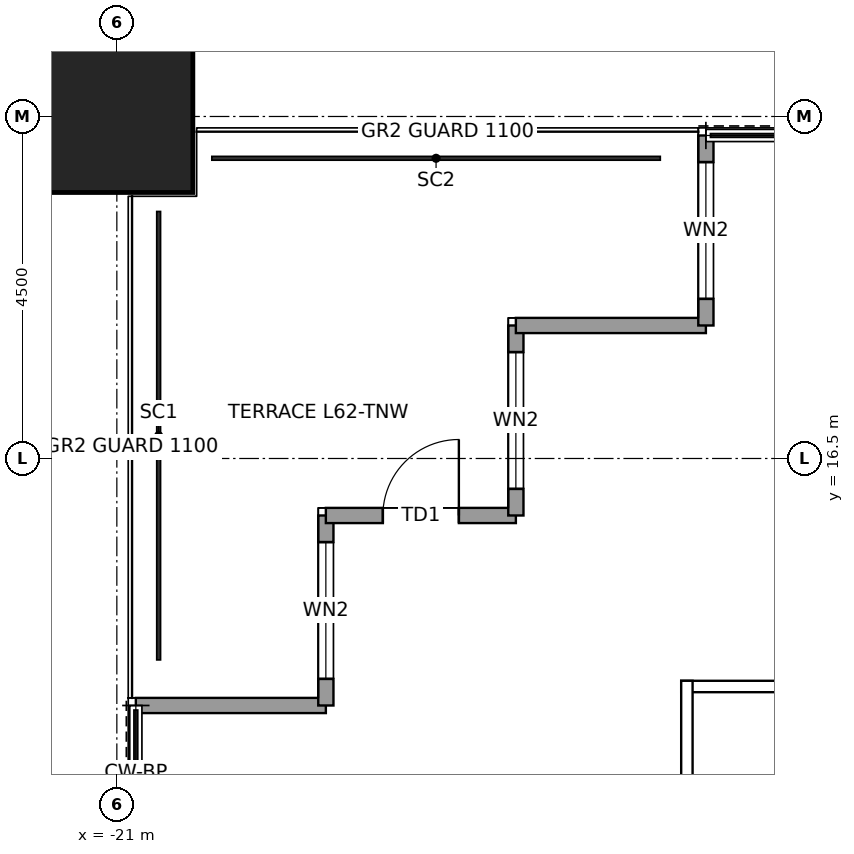
"""IFC4 building model, lengths in metres.
Left out: names, types, materials, properties, quantities, classifications, styles, units other than length and angle.
Written with IfcOpenShell. Run it as: python <this file> out.ifc"""

import sys

from ifc_helpers import new_model, si_unit, direction, frame, frame_2d, origin, origin_2d, place, context, subcontext, project, spatial, rectangle, hollow_rectangle, extrude, element, fill, save


model = new_model("IFC4")
c1 = context("Model", 3, precision=1e-05, world=origin(), true_north=direction((0.0, 1.0)))
c2 = subcontext(c1, "Body", "Model", "MODEL_VIEW")
j1 = project(units=[si_unit("LENGTHUNIT", "METRE"), si_unit("PLANEANGLEUNIT", "RADIAN")], contexts=[c1])
p1 = place(None, origin())
s1 = spatial("IfcSite", under=j1, at=p1, CompositionType="ELEMENT")
p2 = place(p1, origin())
s2 = spatial("IfcBuilding", under=s1, at=p2, CompositionType="ELEMENT")
p3 = place(p2, frame((0.0, 0.0, 283.9)))
s3 = spatial("IfcBuildingStorey", under=s2, at=p3, CompositionType="ELEMENT", Elevation=283.9)
p4 = place(p3, frame((-21.0, 21.0, 0.0), z_axis=(0.0, 0.0, 1.0), x_axis=(1.0, 0.0, 0.0)))
e1 = element("IfcColumn", 1, at=p4, inside=s3, PredefinedType="COLUMN", context=c2, shape_type="SweptSolid", body=[
    extrude(hollow_rectangle(XDim=2.0, YDim=2.0, WallThickness=0.095, at=origin_2d()), origin(), (0.0, 0.0, 1.0), 4.0),
])
p5 = place(p3, frame((-20.75, 13.25, 0.0), z_axis=(0.0, 0.0, 1.0), x_axis=(1.0, 0.0, 0.0)))
e2 = element("IfcWall", 2, at=p5, inside=s3, PredefinedType="SOLIDWALL", context=c2, shape_type="SweptSolid", body=[
    extrude(rectangle(XDim=2.5, YDim=0.2, at=frame_2d((1.25, 0.0))), origin(), (0.0, 0.0, 1.0), 3.85),
])
p6 = place(p3, frame((-18.25, 13.25, 0.0), z_axis=(0.0, 0.0, 1.0), x_axis=(0.0, 1.0, 0.0)))
e3 = element("IfcWall", 3, at=p6, inside=s3, PredefinedType="SOLIDWALL", context=c2, shape_type="SweptSolid", body=[
    extrude(rectangle(XDim=2.5, YDim=0.2, at=frame_2d((1.25, 0.0))), origin(), (0.0, 0.0, 1.0), 3.85),
])
p7 = place(p6, frame((0.35, 0.0, 0.3)))
e4 = element("IfcOpeningElement", 4, at=p7, cuts=e3, PredefinedType="OPENING", context=c2, shape_type="SweptSolid", body=[
    extrude(rectangle(XDim=1.8, YDim=2.4, at=frame_2d((0.9, 1.2))), frame((0.0, 0.11, 0.0), z_axis=(0.0, -1.0, 0.0), x_axis=(1.0, 0.0, 0.0)), (0.0, 0.0, 1.0), 0.22),
])
p8 = place(p3, frame((-18.25, 15.75, 0.0), z_axis=(0.0, 0.0, 1.0), x_axis=(1.0, 0.0, 0.0)))
e5 = element("IfcWall", 5, at=p8, inside=s3, PredefinedType="SOLIDWALL", context=c2, shape_type="SweptSolid", body=[
    extrude(rectangle(XDim=2.5, YDim=0.2, at=frame_2d((1.25, 0.0))), origin(), (0.0, 0.0, 1.0), 3.317),
])
p9 = place(p8, frame((0.75, 0.0, 0.0)))
e6 = element("IfcOpeningElement", 6, at=p9, cuts=e5, PredefinedType="OPENING", context=c2, shape_type="SweptSolid", body=[
    extrude(rectangle(XDim=1.0, YDim=2.4, at=frame_2d((0.5, 1.2))), frame((0.0, 0.11, 0.0), z_axis=(0.0, -1.0, 0.0), x_axis=(1.0, 0.0, 0.0)), (0.0, 0.0, 1.0), 0.22),
])
p10 = place(p3, frame((-15.75, 15.75, 0.0), z_axis=(0.0, 0.0, 1.0), x_axis=(0.0, 1.0, 0.0)))
e7 = element("IfcWall", 7, at=p10, inside=s3, PredefinedType="SOLIDWALL", context=c2, shape_type="SweptSolid", body=[
    extrude(rectangle(XDim=2.5, YDim=0.2, at=frame_2d((1.25, 0.0))), origin(), (0.0, 0.0, 1.0), 3.85),
])
p11 = place(p10, frame((0.35, 0.0, 0.3)))
e8 = element("IfcOpeningElement", 8, at=p11, cuts=e7, PredefinedType="OPENING", context=c2, shape_type="SweptSolid", body=[
    extrude(rectangle(XDim=1.8, YDim=2.4, at=frame_2d((0.9, 1.2))), frame((0.0, 0.11, 0.0), z_axis=(0.0, -1.0, 0.0), x_axis=(1.0, 0.0, 0.0)), (0.0, 0.0, 1.0), 0.22),
])
p12 = place(p3, frame((-15.75, 18.25, 0.0), z_axis=(0.0, 0.0, 1.0), x_axis=(1.0, 0.0, 0.0)))
e9 = element("IfcWall", 9, at=p12, inside=s3, PredefinedType="SOLIDWALL", context=c2, shape_type="SweptSolid", body=[
    extrude(rectangle(XDim=2.5, YDim=0.2, at=frame_2d((1.25, 0.0))), origin(), (0.0, 0.0, 1.0), 3.85),
])
p13 = place(p3, frame((-13.25, 18.25, 0.0), z_axis=(0.0, 0.0, 1.0), x_axis=(0.0, 1.0, 0.0)))
e10 = element("IfcWall", 10, at=p13, inside=s3, PredefinedType="SOLIDWALL", context=c2, shape_type="SweptSolid", body=[
    extrude(rectangle(XDim=2.5, YDim=0.2, at=frame_2d((1.25, 0.0))), origin(), (0.0, 0.0, 1.0), 3.85),
])
p14 = place(p13, frame((0.35, 0.0, 0.3)))
e11 = element("IfcOpeningElement", 11, at=p14, cuts=e10, PredefinedType="OPENING", context=c2, shape_type="SweptSolid", body=[
    extrude(rectangle(XDim=1.8, YDim=2.4, at=frame_2d((0.9, 1.2))), frame((0.0, 0.11, 0.0), z_axis=(0.0, -1.0, 0.0), x_axis=(1.0, 0.0, 0.0)), (0.0, 0.0, 1.0), 0.22),
])
p15 = place(p3, frame((-13.575, 13.5, 0.0), z_axis=(0.0, 0.0, 1.0), x_axis=(1.0, 0.0, 0.0)))
e12 = element("IfcWall", 12, at=p15, inside=s3, PredefinedType="PARTITIONING", context=c2, shape_type="SweptSolid", body=[
    extrude(rectangle(XDim=16.15, YDim=0.15, at=frame_2d((8.075, 0.0))), origin(), (0.0, 0.0, 1.0), 3.85),
])
p16 = place(p3, frame((-13.5, 2.425, 0.0), z_axis=(0.0, 0.0, 1.0), x_axis=(0.0, 1.0, 0.0)))
e13 = element("IfcWall", 13, at=p16, inside=s3, PredefinedType="PARTITIONING", context=c2, shape_type="SweptSolid", body=[
    extrude(rectangle(XDim=11.15, YDim=0.15, at=frame_2d((5.575, 0.0))), origin(), (0.0, 0.0, 1.0), 3.85),
])
p17 = place(p16, frame((5.075, 0.0, 0.0)))
e14 = element("IfcOpeningElement", 14, at=p17, cuts=e13, PredefinedType="OPENING", context=c2, shape_type="SweptSolid", body=[
    extrude(rectangle(XDim=1.0, YDim=2.4, at=frame_2d((0.5, 1.2))), frame((0.0, 0.085, 0.0), z_axis=(0.0, -1.0, 0.0), x_axis=(1.0, 0.0, 0.0)), (0.0, 0.0, 1.0), 0.17),
])
p18 = place(p7, origin())
e15 = element("IfcWindow", 15, at=p18, inside=s3, PartitioningType="SINGLE_PANEL", PredefinedType="WINDOW", context=c2, shape_type="SweptSolid", body=[
    extrude(rectangle(XDim=1.8, YDim=2.4, at=frame_2d((0.9, 1.2))), frame((0.0, 0.03, 0.0), z_axis=(0.0, -1.0, 0.0), x_axis=(1.0, 0.0, 0.0)), (0.0, 0.0, 1.0), 0.06),
])
fill(e4, e15)
p19 = place(p9, origin())
e16 = element("IfcDoor", 16, at=p19, inside=s3, OperationType="SINGLE_SWING_RIGHT", PredefinedType="DOOR", context=c2, shape_type="SweptSolid", body=[
    extrude(rectangle(XDim=1.0, YDim=2.4, at=frame_2d((0.5, 1.2))), frame((0.0, 0.025, 0.0), z_axis=(0.0, -1.0, 0.0), x_axis=(1.0, 0.0, 0.0)), (0.0, 0.0, 1.0), 0.05),
])
fill(e6, e16)
p20 = place(p11, origin())
e17 = element("IfcWindow", 17, at=p20, inside=s3, PartitioningType="SINGLE_PANEL", PredefinedType="WINDOW", context=c2, shape_type="SweptSolid", body=[
    extrude(rectangle(XDim=1.8, YDim=2.4, at=frame_2d((0.9, 1.2))), frame((0.0, 0.03, 0.0), z_axis=(0.0, -1.0, 0.0), x_axis=(1.0, 0.0, 0.0)), (0.0, 0.0, 1.0), 0.06),
])
fill(e8, e17)
p21 = place(p14, origin())
e18 = element("IfcWindow", 18, at=p21, inside=s3, PartitioningType="SINGLE_PANEL", PredefinedType="WINDOW", context=c2, shape_type="SweptSolid", body=[
    extrude(rectangle(XDim=1.8, YDim=2.4, at=frame_2d((0.9, 1.2))), frame((0.0, 0.03, 0.0), z_axis=(0.0, -1.0, 0.0), x_axis=(1.0, 0.0, 0.0)), (0.0, 0.0, 1.0), 0.06),
])
fill(e11, e18)
save(model, sys.argv[1])
